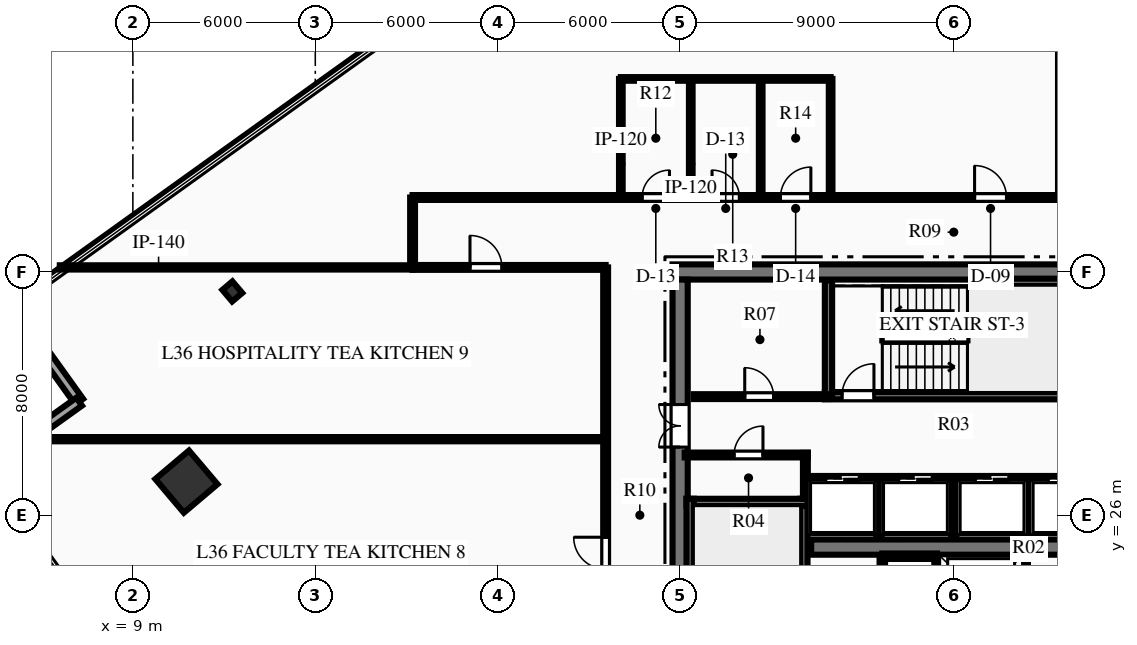
"""IFC4 building model, lengths in metres.
Left out: names, types, materials, properties, quantities, classifications, styles, units other than length and angle.
Written with IfcOpenShell. Run it as: python <this file> out.ifc"""

import sys

from ifc_helpers import new_model, si_unit, direction, frame, frame_2d, origin, origin_2d, place, context, subcontext, project, spatial, rectangle, hollow_rectangle, i_section, extrude, element, fill, save


model = new_model("IFC4")
c1 = context("Model", 3, precision=1e-05, world=origin(), true_north=direction((0.0, 1.0)))
c2 = subcontext(c1, "Body", "Model", "MODEL_VIEW")
j1 = project(units=[si_unit("LENGTHUNIT", "METRE"), si_unit("PLANEANGLEUNIT", "RADIAN")], contexts=[c1])
p1 = place(None, origin())
s1 = spatial("IfcSite", under=j1, at=p1, CompositionType="ELEMENT")
p2 = place(p1, origin())
s2 = spatial("IfcBuilding", under=s1, at=p2, CompositionType="ELEMENT")
p3 = place(p2, frame((0.0, 0.0, 148.2)))
s3 = spatial("IfcBuildingStorey", under=s2, at=p3, CompositionType="ELEMENT", Elevation=148.2)
p4 = place(p3, frame((26.75, 34.0, 0.0), z_axis=(0.0, 0.0, 1.0), x_axis=(1.0, 0.0, 0.0)))
e1 = element("IfcWall", 1, at=p4, inside=s3, PredefinedType="SHEAR", context=c2, shape_type="SweptSolid", body=[
    extrude(rectangle(XDim=18.5, YDim=0.5, at=frame_2d((9.25, 0.0))), origin(), (0.0, 0.0, 1.0), 3.75),
])
p5 = place(p4, frame((13.935, 0.0, 0.0)))
e2 = element("IfcOpeningElement", 2, at=p5, cuts=e1, PredefinedType="OPENING", context=c2, shape_type="SweptSolid", body=[
    extrude(rectangle(XDim=1.1, YDim=2.15, at=frame_2d((0.55, 1.075))), frame((0.0, 0.26, 0.0), z_axis=(0.0, -1.0, 0.0), x_axis=(1.0, 0.0, 0.0)), (0.0, 0.0, 1.0), 0.52),
])
p6 = place(p4, frame((16.185, 0.0, 0.0)))
e3 = element("IfcOpeningElement", 3, at=p6, cuts=e1, PredefinedType="OPENING", context=c2, shape_type="SweptSolid", body=[
    extrude(rectangle(XDim=1.1, YDim=2.15, at=frame_2d((0.55, 1.075))), frame((0.0, 0.26, 0.0), z_axis=(0.0, -1.0, 0.0), x_axis=(1.0, 0.0, 0.0)), (0.0, 0.0, 1.0), 0.52),
])
p7 = place(p3, frame((27.0, 18.25, 0.0), z_axis=(0.0, 0.0, 1.0), x_axis=(0.0, 1.0, 0.0)))
e4 = element("IfcWall", 4, at=p7, inside=s3, PredefinedType="SHEAR", context=c2, shape_type="SweptSolid", body=[
    extrude(rectangle(XDim=15.5, YDim=0.5, at=frame_2d((7.75, 0.0))), origin(), (0.0, 0.0, 1.0), 3.75),
])
p8 = place(p7, frame((9.99, 0.0, 0.0)))
e5 = element("IfcOpeningElement", 5, at=p8, cuts=e4, PredefinedType="OPENING", context=c2, shape_type="SweptSolid", body=[
    extrude(rectangle(XDim=1.4, YDim=2.2, at=frame_2d((0.7, 1.1))), frame((0.0, 0.26, 0.0), z_axis=(0.0, -1.0, 0.0), x_axis=(1.0, 0.0, 0.0)), (0.0, 0.0, 1.0), 0.52),
])
p9 = place(p3, frame((31.31, 24.95, 0.0), z_axis=(0.0, 0.0, 1.0), x_axis=(1.0, 0.0, 0.0)))
e6 = element("IfcWall", 6, at=p9, inside=s3, PredefinedType="SHEAR", context=c2, shape_type="SweptSolid", body=[
    extrude(rectangle(XDim=9.38, YDim=0.5, at=frame_2d((4.69, 0.0))), origin(), (0.0, 0.0, 1.0), 3.75),
])
p10 = place(p3, frame((31.07, 18.28, 0.0), z_axis=(0.0, 0.0, 1.0), x_axis=(0.0, 1.0, 0.0)))
e7 = element("IfcWall", 7, at=p10, inside=s3, PredefinedType="SHEAR", context=c2, shape_type="SweptSolid", body=[
    extrude(rectangle(XDim=8.26, YDim=0.24, at=frame_2d((4.13, 0.0))), origin(), (0.0, 0.0, 1.0), 3.75),
])
p11 = place(p10, frame((0.365, 0.0, 0.0)))
e8 = element("IfcOpeningElement", 8, at=p11, cuts=e7, PredefinedType="OPENING", context=c2, shape_type="SweptSolid", body=[
    extrude(rectangle(XDim=1.05, YDim=2.15, at=frame_2d((0.525, 1.075))), frame((0.0, 0.13, 0.0), z_axis=(0.0, -1.0, 0.0), x_axis=(1.0, 0.0, 0.0)), (0.0, 0.0, 1.0), 0.26),
])
p12 = place(p3, frame((27.21, 26.42, 0.0), z_axis=(0.0, 0.0, 1.0), x_axis=(1.0, 0.0, 0.0)))
e9 = element("IfcWall", 9, at=p12, inside=s3, PredefinedType="SHEAR", context=c2, shape_type="SweptSolid", body=[
    extrude(rectangle(XDim=3.98, YDim=0.24, at=frame_2d((1.99, 0.0))), origin(), (0.0, 0.0, 1.0), 3.75),
])
p13 = place(p3, frame((27.33, 18.28, 0.0), z_axis=(0.0, 0.0, 1.0), x_axis=(0.0, 1.0, 0.0)))
e10 = element("IfcWall", 10, at=p13, inside=s3, PredefinedType="SHEAR", context=c2, shape_type="SweptSolid", body=[
    extrude(rectangle(XDim=8.26, YDim=0.24, at=frame_2d((4.13, 0.0))), origin(), (0.0, 0.0, 1.0), 3.75),
])
p14 = place(p3, frame((31.76, 29.93, 0.0), z_axis=(0.0, 0.0, 1.0), x_axis=(1.0, 0.0, 0.0)))
e11 = element("IfcWall", 11, at=p14, inside=s3, PredefinedType="SHEAR", context=c2, shape_type="SweptSolid", body=[
    extrude(rectangle(XDim=8.38, YDim=0.24, at=frame_2d((4.19, 0.0))), origin(), (0.0, 0.0, 1.0), 3.75),
])
p15 = place(p14, frame((0.565, 0.0, 0.0)))
e12 = element("IfcOpeningElement", 12, at=p15, cuts=e11, PredefinedType="OPENING", context=c2, shape_type="SweptSolid", body=[
    extrude(rectangle(XDim=1.05, YDim=2.15, at=frame_2d((0.525, 1.075))), frame((0.0, 0.13, 0.0), z_axis=(0.0, -1.0, 0.0), x_axis=(1.0, 0.0, 0.0)), (0.0, 0.0, 1.0), 0.26),
])
p16 = place(p3, frame((31.88, 29.93, 0.0), z_axis=(0.0, 0.0, 1.0), x_axis=(0.0, 1.0, 0.0)))
e13 = element("IfcWall", 13, at=p16, inside=s3, PredefinedType="SHEAR", context=c2, shape_type="SweptSolid", body=[
    extrude(rectangle(XDim=3.79, YDim=0.24, at=frame_2d((1.895, 0.0))), origin(), (0.0, 0.0, 1.0), 3.75),
])
p17 = place(p3, frame((37.85, 33.66, 0.0), z_axis=(0.0, 0.0, 1.0), x_axis=(1.0, 0.0, 0.0)))
e14 = element("IfcWall", 14, at=p17, inside=s3, PredefinedType="SHEAR", context=c2, shape_type="SweptSolid", body=[
    extrude(rectangle(XDim=2.29, YDim=0.24, at=frame_2d((1.145, 0.0))), origin(), (0.0, 0.0, 1.0), 3.75),
])
p18 = place(p3, frame((10.761, 27.104, 0.0), z_axis=(0.0, 0.0, 1.0), x_axis=(0.763232469783, 0.646123979643, 0.0)))
e15 = element("IfcColumn", 15, at=p18, inside=s3, PredefinedType="COLUMN", context=c2, shape_type="SweptSolid", body=[
    extrude(hollow_rectangle(XDim=1.45, YDim=1.45, WallThickness=0.07, at=origin_2d()), origin(), (0.0, 0.0, 1.0), 3.75),
])
p19 = place(p3, frame((12.27, 33.36, 0.0), z_axis=(0.0, 0.0, 1.0), x_axis=(0.763232469783, 0.646123979643, 0.0)))
e16 = element("IfcColumn", 16, at=p19, inside=s3, PredefinedType="COLUMN", context=c2, shape_type="SweptSolid", body=[
    extrude(i_section(OverallWidth=0.432, OverallDepth=0.498, WebThickness=0.056, FlangeThickness=0.089, at=origin_2d()), origin(), (0.0, 0.0, 1.0), 3.75),
])
for number, where, z_axis, x_axis in (
    (17, (7.233, 29.733, 0.0), (0.0, 0.0, 1.0), (-0.583, 0.813, 0.0)),
    (18, (3.983, 27.402, 0.0), (0.0, 0.0, 1.0), (0.813, 0.583, 0.0)),
):
    element("IfcWall", number, at=place(p3, frame(where, z_axis=z_axis, x_axis=x_axis)), inside=s3, PredefinedType="STANDARD", context=c2, shape_type="SweptSolid", body=[
        extrude(rectangle(XDim=4.0, YDim=0.32, at=frame_2d((2.0, 0.0))), origin(), (0.0, 0.0, 1.0), 3.46),
    ])
for number, where, z_axis, x_axis in (
    (19, (33.65, 22.05, 0.0), (0.0, 0.0, 1.0), (0.0, 1.0, 0.0)),
    (20, (35.45, 22.05, 0.0), (0.0, 0.0, 1.0), (0.0, 1.0, 0.0)),
):
    element("IfcWall", number, at=place(p3, frame(where, z_axis=z_axis, x_axis=x_axis)), inside=s3, PredefinedType="PARTITIONING", context=c2, shape_type="SweptSolid", body=[
        extrude(rectangle(XDim=2.6, YDim=0.18, at=frame_2d((1.3, 0.0))), origin(), (0.0, 0.0, 1.0), 3.46),
    ])
p20 = place(p3, frame((33.65, 24.65, 0.0), z_axis=(0.0, 0.0, 1.0), x_axis=(1.0, 0.0, 0.0)))
e21 = element("IfcWall", 21, at=p20, inside=s3, PredefinedType="PARTITIONING", context=c2, shape_type="SweptSolid", body=[
    extrude(rectangle(XDim=1.8, YDim=0.18, at=frame_2d((0.9, 0.0))), origin(), (0.0, 0.0, 1.0), 3.46),
])
p21 = place(p3, frame((38.35, 22.05, 0.0), z_axis=(0.0, 0.0, 1.0), x_axis=(0.0, 1.0, 0.0)))
e22 = element("IfcWall", 22, at=p21, inside=s3, PredefinedType="PARTITIONING", context=c2, shape_type="SweptSolid", body=[
    extrude(rectangle(XDim=2.6, YDim=0.18, at=frame_2d((1.3, 0.0))), origin(), (0.0, 0.0, 1.0), 3.46),
])
p22 = place(p3, frame((27.15, 27.98, 0.0), z_axis=(0.0, 0.0, 1.0), x_axis=(1.0, 0.0, 0.0)))
e23 = element("IfcWall", 23, at=p22, inside=s3, PredefinedType="PARTITIONING", context=c2, shape_type="SweptSolid", body=[
    extrude(rectangle(XDim=4.05, YDim=0.16, at=frame_2d((2.025, 0.0))), origin(), (0.0, 0.0, 1.0), 3.46),
])
p23 = place(p22, frame((1.625, 0.0, 0.0)))
e24 = element("IfcOpeningElement", 24, at=p23, cuts=e23, PredefinedType="OPENING", context=c2, shape_type="SweptSolid", body=[
    extrude(rectangle(XDim=0.95, YDim=2.15, at=frame_2d((0.475, 1.075))), frame((0.0, 0.09, 0.0), z_axis=(0.0, -1.0, 0.0), x_axis=(1.0, 0.0, 0.0)), (0.0, 0.0, 1.0), 0.18),
])
p24 = place(p3, frame((31.12, 26.54, 0.0), z_axis=(0.0, 0.0, 1.0), x_axis=(0.0, 1.0, 0.0)))
e25 = element("IfcWall", 25, at=p24, inside=s3, PredefinedType="PARTITIONING", context=c2, shape_type="SweptSolid", body=[
    extrude(rectangle(XDim=1.51, YDim=0.16, at=frame_2d((0.755, 0.0))), origin(), (0.0, 0.0, 1.0), 3.46),
])
p25 = place(p3, frame((27.45, 29.9, 0.0), z_axis=(0.0, 0.0, 1.0), x_axis=(1.0, 0.0, 0.0)))
e26 = element("IfcWall", 26, at=p25, inside=s3, PredefinedType="PARTITIONING", context=c2, shape_type="SweptSolid", body=[
    extrude(rectangle(XDim=4.43, YDim=0.16, at=frame_2d((2.215, 0.0))), origin(), (0.0, 0.0, 1.0), 3.46),
])
p26 = place(p25, frame((1.675, 0.0, 0.0)))
e27 = element("IfcOpeningElement", 27, at=p26, cuts=e26, PredefinedType="OPENING", context=c2, shape_type="SweptSolid", body=[
    extrude(rectangle(XDim=0.95, YDim=2.15, at=frame_2d((0.475, 1.075))), frame((0.0, 0.09, 0.0), z_axis=(0.0, -1.0, 0.0), x_axis=(1.0, 0.0, 0.0)), (0.0, 0.0, 1.0), 0.18),
])
p27 = place(p3, frame((31.2, 27.2, 0.0), z_axis=(0.0, 0.0, 1.0), x_axis=(1.0, 0.0, 0.0)))
e28 = element("IfcWall", 28, at=p27, inside=s3, PredefinedType="PARTITIONING", context=c2, shape_type="SweptSolid", body=[
    extrude(rectangle(XDim=9.6, YDim=0.18, at=frame_2d((4.8, 0.0))), origin(), (0.0, 0.0, 1.0), 3.46),
])
p28 = place(p27, frame((0.59, 0.0, 0.0)))
e29 = element("IfcOpeningElement", 29, at=p28, cuts=e28, PredefinedType="OPENING", context=c2, shape_type="SweptSolid", body=[
    extrude(rectangle(XDim=1.1, YDim=2.15, at=frame_2d((0.55, 1.075))), frame((0.0, 0.1, 0.0), z_axis=(0.0, -1.0, 0.0), x_axis=(1.0, 0.0, 0.0)), (0.0, 0.0, 1.0), 0.2),
])
p29 = place(p27, frame((2.99, 0.0, 0.0)))
e30 = element("IfcOpeningElement", 30, at=p29, cuts=e28, PredefinedType="OPENING", context=c2, shape_type="SweptSolid", body=[
    extrude(rectangle(XDim=1.1, YDim=2.15, at=frame_2d((0.55, 1.075))), frame((0.0, 0.1, 0.0), z_axis=(0.0, -1.0, 0.0), x_axis=(1.0, 0.0, 0.0)), (0.0, 0.0, 1.0), 0.2),
])
p30 = place(p27, frame((5.51, 0.0, 0.0)))
e31 = element("IfcOpeningElement", 31, at=p30, cuts=e28, PredefinedType="OPENING", context=c2, shape_type="SweptSolid", body=[
    extrude(rectangle(XDim=1.1, YDim=2.15, at=frame_2d((0.55, 1.075))), frame((0.0, 0.1, 0.0), z_axis=(0.0, -1.0, 0.0), x_axis=(1.0, 0.0, 0.0)), (0.0, 0.0, 1.0), 0.2),
])
p31 = place(p27, frame((7.91, 0.0, 0.0)))
e32 = element("IfcOpeningElement", 32, at=p31, cuts=e28, PredefinedType="OPENING", context=c2, shape_type="SweptSolid", body=[
    extrude(rectangle(XDim=1.1, YDim=2.15, at=frame_2d((0.55, 1.075))), frame((0.0, 0.1, 0.0), z_axis=(0.0, -1.0, 0.0), x_axis=(1.0, 0.0, 0.0)), (0.0, 0.0, 1.0), 0.2),
])
for number, where, z_axis, x_axis in (
    (33, (33.54, 25.3, 0.0), (0.0, 0.0, 1.0), (0.0, 1.0, 0.0)),
    (34, (36.0, 25.3, 0.0), (0.0, 0.0, 1.0), (0.0, 1.0, 0.0)),
    (35, (38.46, 25.3, 0.0), (0.0, 0.0, 1.0), (0.0, 1.0, 0.0)),
):
    element("IfcWall", number, at=place(p3, frame(where, z_axis=z_axis, x_axis=x_axis)), inside=s3, PredefinedType="PARTITIONING", context=c2, shape_type="SweptSolid", body=[
        extrude(rectangle(XDim=1.9, YDim=0.18, at=frame_2d((0.95, 0.0))), origin(), (0.0, 0.0, 1.0), 3.46),
    ])
p32 = place(p3, frame((18.2, 36.45, 0.0), z_axis=(0.0, 0.0, 1.0), x_axis=(1.0, 0.0, 0.0)))
e36 = element("IfcWall", 36, at=p32, inside=s3, PredefinedType="PARTITIONING", context=c2, shape_type="SweptSolid", body=[
    extrude(rectangle(XDim=35.6, YDim=0.16, at=frame_2d((17.8, 0.0))), origin(), (0.0, 0.0, 1.0), 3.46),
])
p33 = place(p32, frame((7.55, 0.0, 0.0)))
e37 = element("IfcOpeningElement", 37, at=p33, cuts=e36, PredefinedType="OPENING", context=c2, shape_type="SweptSolid", body=[
    extrude(rectangle(XDim=0.9, YDim=2.15, at=frame_2d((0.45, 1.075))), frame((0.0, 0.09, 0.0), z_axis=(0.0, -1.0, 0.0), x_axis=(1.0, 0.0, 0.0)), (0.0, 0.0, 1.0), 0.18),
])
p34 = place(p32, frame((9.85, 0.0, 0.0)))
e38 = element("IfcOpeningElement", 38, at=p34, cuts=e36, PredefinedType="OPENING", context=c2, shape_type="SweptSolid", body=[
    extrude(rectangle(XDim=0.9, YDim=2.15, at=frame_2d((0.45, 1.075))), frame((0.0, 0.09, 0.0), z_axis=(0.0, -1.0, 0.0), x_axis=(1.0, 0.0, 0.0)), (0.0, 0.0, 1.0), 0.18),
])
p35 = place(p32, frame((12.1, 0.0, 0.0)))
e39 = element("IfcOpeningElement", 39, at=p35, cuts=e36, PredefinedType="OPENING", context=c2, shape_type="SweptSolid", body=[
    extrude(rectangle(XDim=1.0, YDim=2.15, at=frame_2d((0.5, 1.075))), frame((0.0, 0.09, 0.0), z_axis=(0.0, -1.0, 0.0), x_axis=(1.0, 0.0, 0.0)), (0.0, 0.0, 1.0), 0.18),
])
p36 = place(p32, frame((18.485, 0.0, 0.0)))
e40 = element("IfcOpeningElement", 40, at=p36, cuts=e36, PredefinedType="OPENING", context=c2, shape_type="SweptSolid", body=[
    extrude(rectangle(XDim=1.05, YDim=2.15, at=frame_2d((0.525, 1.075))), frame((0.0, 0.09, 0.0), z_axis=(0.0, -1.0, 0.0), x_axis=(1.0, 0.0, 0.0)), (0.0, 0.0, 1.0), 0.18),
])
p37 = place(p32, frame((25.125, 0.0, 0.0)))
e41 = element("IfcOpeningElement", 41, at=p37, cuts=e36, PredefinedType="OPENING", context=c2, shape_type="SweptSolid", body=[
    extrude(rectangle(XDim=1.05, YDim=2.15, at=frame_2d((0.525, 1.075))), frame((0.0, 0.09, 0.0), z_axis=(0.0, -1.0, 0.0), x_axis=(1.0, 0.0, 0.0)), (0.0, 0.0, 1.0), 0.18),
])
p38 = place(p3, frame((18.2, 34.15, 0.0), z_axis=(0.0, 0.0, 1.0), x_axis=(1.0, 0.0, 0.0)))
e42 = element("IfcWall", 42, at=p38, inside=s3, PredefinedType="PARTITIONING", context=c2, shape_type="SweptSolid", body=[
    extrude(rectangle(XDim=6.35, YDim=0.16, at=frame_2d((3.175, 0.0))), origin(), (0.0, 0.0, 1.0), 3.46),
])
p39 = place(p38, frame((1.888, 0.0, 0.0)))
e43 = element("IfcOpeningElement", 43, at=p39, cuts=e42, PredefinedType="OPENING", context=c2, shape_type="SweptSolid", body=[
    extrude(rectangle(XDim=1.05, YDim=2.15, at=frame_2d((0.525, 1.075))), frame((0.0, 0.09, 0.0), z_axis=(0.0, -1.0, 0.0), x_axis=(1.0, 0.0, 0.0)), (0.0, 0.0, 1.0), 0.18),
])
p40 = place(p3, frame((24.55, 17.85, 0.0), z_axis=(0.0, 0.0, 1.0), x_axis=(0.0, 1.0, 0.0)))
e44 = element("IfcWall", 44, at=p40, inside=s3, PredefinedType="PARTITIONING", context=c2, shape_type="SweptSolid", body=[
    extrude(rectangle(XDim=16.3, YDim=0.16, at=frame_2d((8.15, 0.0))), origin(), (0.0, 0.0, 1.0), 3.46),
])
p41 = place(p40, frame((6.375, 0.0, 0.0)))
e45 = element("IfcOpeningElement", 45, at=p41, cuts=e44, PredefinedType="OPENING", context=c2, shape_type="SweptSolid", body=[
    extrude(rectangle(XDim=1.05, YDim=2.15, at=frame_2d((0.525, 1.075))), frame((0.0, 0.09, 0.0), z_axis=(0.0, -1.0, 0.0), x_axis=(1.0, 0.0, 0.0)), (0.0, 0.0, 1.0), 0.18),
])
p42 = place(p3, frame((18.2, 34.15, 0.0), z_axis=(0.0, 0.0, 1.0), x_axis=(0.0, 1.0, 0.0)))
e46 = element("IfcWall", 46, at=p42, inside=s3, PredefinedType="PARTITIONING", context=c2, shape_type="SweptSolid", body=[
    extrude(rectangle(XDim=2.3, YDim=0.16, at=frame_2d((1.15, 0.0))), origin(), (0.0, 0.0, 1.0), 3.46),
])
for number, where, z_axis, x_axis in (
    (47, (25.05, 36.45, 0.0), (0.0, 0.0, 1.0), (0.0, 1.0, 0.0)),
    (48, (27.35, 36.45, 0.0), (0.0, 0.0, 1.0), (0.0, 1.0, 0.0)),
    (49, (29.65, 36.45, 0.0), (0.0, 0.0, 1.0), (0.0, 1.0, 0.0)),
    (50, (31.95, 36.45, 0.0), (0.0, 0.0, 1.0), (0.0, 1.0, 0.0)),
):
    element("IfcWall", number, at=place(p3, frame(where, z_axis=z_axis, x_axis=x_axis)), inside=s3, PredefinedType="PARTITIONING", context=c2, shape_type="SweptSolid", body=[
        extrude(rectangle(XDim=3.9, YDim=0.12, at=frame_2d((1.95, 0.0))), origin(), (0.0, 0.0, 1.0), 3.46),
    ])
p43 = place(p3, frame((25.05, 40.35, 0.0), z_axis=(0.0, 0.0, 1.0), x_axis=(1.0, 0.0, 0.0)))
e51 = element("IfcWall", 51, at=p43, inside=s3, PredefinedType="PARTITIONING", context=c2, shape_type="SweptSolid", body=[
    extrude(rectangle(XDim=6.9, YDim=0.12, at=frame_2d((3.45, 0.0))), origin(), (0.0, 0.0, 1.0), 3.46),
])
p44 = place(p3, frame((6.596, 34.15, 0.0), z_axis=(0.0, 0.0, 1.0), x_axis=(1.0, 0.0, 0.0)))
e52 = element("IfcWall", 52, at=p44, inside=s3, PredefinedType="PARTITIONING", context=c2, shape_type="SweptSolid", body=[
    extrude(rectangle(XDim=11.604, YDim=0.14, at=frame_2d((5.802, 0.0))), origin(), (0.0, 0.0, 1.0), 3.46),
])
p45 = place(p3, frame((5.582, 28.5, 0.0), z_axis=(0.0, 0.0, 1.0), x_axis=(1.0, 0.0, 0.0)))
e53 = element("IfcWall", 53, at=p45, inside=s3, PredefinedType="PARTITIONING", context=c2, shape_type="SweptSolid", body=[
    extrude(rectangle(XDim=18.968, YDim=0.14, at=frame_2d((9.484, 0.0))), origin(), (0.0, 0.0, 1.0), 3.46),
])
p46 = place(p23, origin())
e54 = element("IfcDoor", 54, at=p46, inside=s3, OperationType="SINGLE_SWING_RIGHT", PredefinedType="DOOR", context=c2, shape_type="SweptSolid", body=[
    extrude(rectangle(XDim=0.95, YDim=2.15, at=frame_2d((0.475, 1.075))), frame((0.0, 0.025, 0.0), z_axis=(0.0, -1.0, 0.0), x_axis=(1.0, 0.0, 0.0)), (0.0, 0.0, 1.0), 0.05),
])
fill(e24, e54)
p47 = place(p26, origin())
e55 = element("IfcDoor", 55, at=p47, inside=s3, OperationType="SINGLE_SWING_LEFT", PredefinedType="DOOR", context=c2, shape_type="SweptSolid", body=[
    extrude(rectangle(XDim=0.95, YDim=2.15, at=frame_2d((0.475, 1.075))), frame((0.0, 0.025, 0.0), z_axis=(0.0, -1.0, 0.0), x_axis=(1.0, 0.0, 0.0)), (0.0, 0.0, 1.0), 0.05),
])
fill(e27, e55)
p48 = place(p15, origin())
e56 = element("IfcDoor", 56, at=p48, inside=s3, OperationType="SINGLE_SWING_RIGHT", PredefinedType="DOOR", context=c2, shape_type="SweptSolid", body=[
    extrude(rectangle(XDim=1.05, YDim=2.15, at=frame_2d((0.525, 1.075))), frame((0.0, 0.025, 0.0), z_axis=(0.0, -1.0, 0.0), x_axis=(1.0, 0.0, 0.0)), (0.0, 0.0, 1.0), 0.05),
])
fill(e12, e56)
p49 = place(p8, origin())
e57 = element("IfcDoor", 57, at=p49, inside=s3, OperationType="DOUBLE_DOOR_SINGLE_SWING", PredefinedType="DOOR", context=c2, shape_type="SweptSolid", body=[
    extrude(rectangle(XDim=1.4, YDim=2.2, at=frame_2d((0.7, 1.1))), frame((0.0, 0.025, 0.0), z_axis=(0.0, -1.0, 0.0), x_axis=(1.0, 0.0, 0.0)), (0.0, 0.0, 1.0), 0.05),
])
fill(e5, e57)
p50 = place(p33, origin())
e58 = element("IfcDoor", 58, at=p50, inside=s3, OperationType="SINGLE_SWING_RIGHT", PredefinedType="DOOR", context=c2, shape_type="SweptSolid", body=[
    extrude(rectangle(XDim=0.9, YDim=2.15, at=frame_2d((0.45, 1.075))), frame((0.0, 0.025, 0.0), z_axis=(0.0, -1.0, 0.0), x_axis=(1.0, 0.0, 0.0)), (0.0, 0.0, 1.0), 0.05),
])
fill(e37, e58)
p51 = place(p34, origin())
e59 = element("IfcDoor", 59, at=p51, inside=s3, OperationType="SINGLE_SWING_LEFT", PredefinedType="DOOR", context=c2, shape_type="SweptSolid", body=[
    extrude(rectangle(XDim=0.9, YDim=2.15, at=frame_2d((0.45, 1.075))), frame((0.0, 0.025, 0.0), z_axis=(0.0, -1.0, 0.0), x_axis=(1.0, 0.0, 0.0)), (0.0, 0.0, 1.0), 0.05),
])
fill(e38, e59)
p52 = place(p35, origin())
e60 = element("IfcDoor", 60, at=p52, inside=s3, OperationType="SINGLE_SWING_RIGHT", PredefinedType="DOOR", context=c2, shape_type="SweptSolid", body=[
    extrude(rectangle(XDim=1.0, YDim=2.15, at=frame_2d((0.5, 1.075))), frame((0.0, 0.025, 0.0), z_axis=(0.0, -1.0, 0.0), x_axis=(1.0, 0.0, 0.0)), (0.0, 0.0, 1.0), 0.05),
])
fill(e39, e60)
p53 = place(p36, origin())
e61 = element("IfcDoor", 61, at=p53, inside=s3, OperationType="SINGLE_SWING_LEFT", PredefinedType="DOOR", context=c2, shape_type="SweptSolid", body=[
    extrude(rectangle(XDim=1.05, YDim=2.15, at=frame_2d((0.525, 1.075))), frame((0.0, 0.025, 0.0), z_axis=(0.0, -1.0, 0.0), x_axis=(1.0, 0.0, 0.0)), (0.0, 0.0, 1.0), 0.05),
])
fill(e40, e61)
p54 = place(p41, origin())
e62 = element("IfcDoor", 62, at=p54, inside=s3, OperationType="SINGLE_SWING_RIGHT", PredefinedType="DOOR", context=c2, shape_type="SweptSolid", body=[
    extrude(rectangle(XDim=1.05, YDim=2.15, at=frame_2d((0.525, 1.075))), frame((0.0, 0.025, 0.0), z_axis=(0.0, -1.0, 0.0), x_axis=(1.0, 0.0, 0.0)), (0.0, 0.0, 1.0), 0.05),
])
fill(e45, e62)
p55 = place(p39, origin())
e63 = element("IfcDoor", 63, at=p55, inside=s3, OperationType="SINGLE_SWING_LEFT", PredefinedType="DOOR", context=c2, shape_type="SweptSolid", body=[
    extrude(rectangle(XDim=1.05, YDim=2.15, at=frame_2d((0.525, 1.075))), frame((0.0, 0.025, 0.0), z_axis=(0.0, -1.0, 0.0), x_axis=(1.0, 0.0, 0.0)), (0.0, 0.0, 1.0), 0.05),
])
fill(e43, e63)
p56 = place(p28, origin())
e64 = element("IfcDoor", 64, at=p56, inside=s3, OperationType="SLIDING_TO_LEFT", PredefinedType="DOOR", context=c2, shape_type="SweptSolid", body=[
    extrude(rectangle(XDim=1.1, YDim=2.15, at=frame_2d((0.55, 1.075))), frame((0.0, 0.025, 0.0), z_axis=(0.0, -1.0, 0.0), x_axis=(1.0, 0.0, 0.0)), (0.0, 0.0, 1.0), 0.05),
])
fill(e29, e64)
p57 = place(p29, origin())
e65 = element("IfcDoor", 65, at=p57, inside=s3, OperationType="SLIDING_TO_LEFT", PredefinedType="DOOR", context=c2, shape_type="SweptSolid", body=[
    extrude(rectangle(XDim=1.1, YDim=2.15, at=frame_2d((0.55, 1.075))), frame((0.0, 0.025, 0.0), z_axis=(0.0, -1.0, 0.0), x_axis=(1.0, 0.0, 0.0)), (0.0, 0.0, 1.0), 0.05),
])
fill(e30, e65)
p58 = place(p30, origin())
e66 = element("IfcDoor", 66, at=p58, inside=s3, OperationType="SLIDING_TO_LEFT", PredefinedType="DOOR", context=c2, shape_type="SweptSolid", body=[
    extrude(rectangle(XDim=1.1, YDim=2.15, at=frame_2d((0.55, 1.075))), frame((0.0, 0.025, 0.0), z_axis=(0.0, -1.0, 0.0), x_axis=(1.0, 0.0, 0.0)), (0.0, 0.0, 1.0), 0.05),
])
fill(e31, e66)
p59 = place(p31, origin())
e67 = element("IfcDoor", 67, at=p59, inside=s3, OperationType="SLIDING_TO_LEFT", PredefinedType="DOOR", context=c2, shape_type="SweptSolid", body=[
    extrude(rectangle(XDim=1.1, YDim=2.15, at=frame_2d((0.55, 1.075))), frame((0.0, 0.025, 0.0), z_axis=(0.0, -1.0, 0.0), x_axis=(1.0, 0.0, 0.0)), (0.0, 0.0, 1.0), 0.05),
])
fill(e32, e67)
save(model, sys.argv[1])
